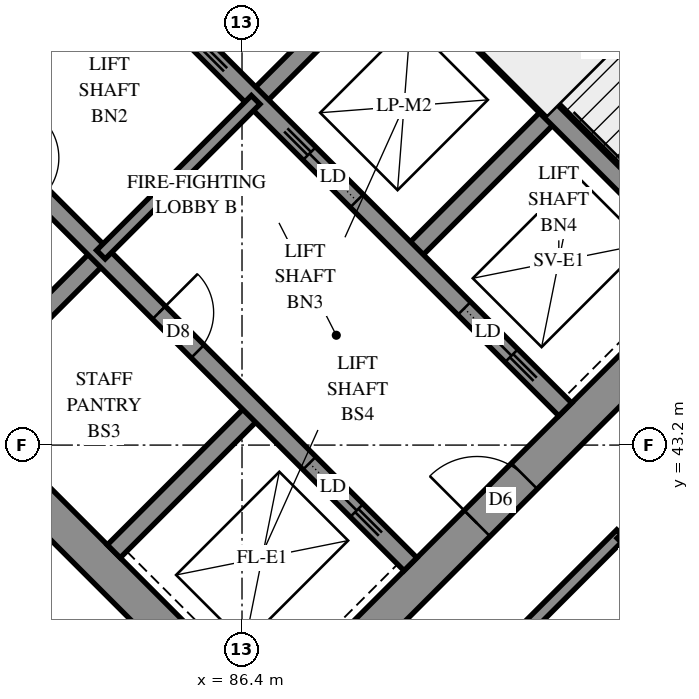
"""IFC4 building model, lengths in metres.
Left out: names, types, materials, properties, quantities, classifications, styles, units other than length and angle.
Written with IfcOpenShell. Run it as: python <this file> out.ifc"""

import sys

from ifc_helpers import new_model, si_unit, direction, frame, frame_2d, origin, place, context, subcontext, project, spatial, rectangle, extrude, element, fill, save


model = new_model("IFC4")
c1 = context("Model", 3, precision=1e-05, world=origin(), true_north=direction((0.0, 1.0)))
c2 = subcontext(c1, "Body", "Model", "MODEL_VIEW")
j1 = project(units=[si_unit("LENGTHUNIT", "METRE"), si_unit("PLANEANGLEUNIT", "RADIAN")], contexts=[c1])
p1 = place(None, origin())
s1 = spatial("IfcSite", under=j1, at=p1, CompositionType="ELEMENT")
p2 = place(p1, origin())
s2 = spatial("IfcBuilding", under=s1, at=p2, CompositionType="ELEMENT")
p3 = place(p2, frame((0.0, 0.0, 149.0)))
s3 = spatial("IfcBuildingStorey", under=s2, at=p3, CompositionType="ELEMENT", Elevation=149.0)
p4 = place(p3, frame((76.018, 49.302, -0.3), z_axis=(0.0, 0.0, 1.0), x_axis=(0.7071067812, -0.7071067812, 0.0)))
e1 = element("IfcWall", 1, at=p4, inside=s3, PredefinedType="SHEAR", context=c2, shape_type="SweptSolid", body=[
    extrude(rectangle(XDim=15.6, YDim=0.6, at=frame_2d((7.8, 0.0))), origin(), (0.0, 0.0, 1.0), 2.7),
])
p5 = place(p3, frame((86.625, 59.908, -0.3), z_axis=(0.0, 0.0, 1.0), x_axis=(0.7071067812, -0.7071067812, 0.0)))
e2 = element("IfcWall", 2, at=p5, inside=s3, PredefinedType="SHEAR", context=c2, shape_type="SweptSolid", body=[
    extrude(rectangle(XDim=15.6, YDim=0.6, at=frame_2d((7.8, 0.0))), origin(), (0.0, 0.0, 1.0), 2.7),
])
p6 = place(p5, frame((10.6, 0.0, 0.3)))
e3 = element("IfcOpeningElement", 3, at=p6, cuts=e2, PredefinedType="OPENING", context=c2, shape_type="SweptSolid", body=[
    extrude(rectangle(XDim=0.8, YDim=2.1, at=frame_2d((0.4, 1.05))), frame((0.0, 0.31, 0.0), z_axis=(0.0, -1.0, 0.0), x_axis=(1.0, 0.0, 0.0)), (0.0, 0.0, 1.0), 0.62),
])
p7 = place(p3, frame((76.442, 49.302, -0.3), z_axis=(0.0, 0.0, 1.0), x_axis=(0.7071067812, 0.7071067812, 0.0)))
e4 = element("IfcWall", 4, at=p7, inside=s3, PredefinedType="SHEAR", context=c2, shape_type="SweptSolid", body=[
    extrude(rectangle(XDim=14.4, YDim=0.6, at=frame_2d((7.2, 0.0))), origin(), (0.0, 0.0, 1.0), 2.7),
])
p8 = place(p7, frame((4.55, 0.0, 0.3)))
e5 = element("IfcOpeningElement", 5, at=p8, cuts=e4, PredefinedType="OPENING", context=c2, shape_type="SweptSolid", body=[
    extrude(rectangle(XDim=1.1, YDim=2.1, at=frame_2d((0.55, 1.05))), frame((0.0, 0.31, 0.0), z_axis=(0.0, -1.0, 0.0), x_axis=(1.0, 0.0, 0.0)), (0.0, 0.0, 1.0), 0.62),
])
p9 = place(p7, frame((11.35, 0.0, 0.3)))
e6 = element("IfcOpeningElement", 6, at=p9, cuts=e4, PredefinedType="OPENING", context=c2, shape_type="SweptSolid", body=[
    extrude(rectangle(XDim=1.1, YDim=2.1, at=frame_2d((0.55, 1.05))), frame((0.0, 0.31, 0.0), z_axis=(0.0, -1.0, 0.0), x_axis=(1.0, 0.0, 0.0)), (0.0, 0.0, 1.0), 0.62),
])
p10 = place(p3, frame((87.049, 38.695, -0.3), z_axis=(0.0, 0.0, 1.0), x_axis=(0.7071067812, 0.7071067812, 0.0)))
e7 = element("IfcWall", 7, at=p10, inside=s3, PredefinedType="SHEAR", context=c2, shape_type="SweptSolid", body=[
    extrude(rectangle(XDim=14.4, YDim=0.6, at=frame_2d((7.2, 0.0))), origin(), (0.0, 0.0, 1.0), 2.7),
])
p11 = place(p10, frame((4.55, 0.0, 0.3)))
e8 = element("IfcOpeningElement", 8, at=p11, cuts=e7, PredefinedType="OPENING", context=c2, shape_type="SweptSolid", body=[
    extrude(rectangle(XDim=1.1, YDim=2.1, at=frame_2d((0.55, 1.05))), frame((0.0, 0.31, 0.0), z_axis=(0.0, -1.0, 0.0), x_axis=(1.0, 0.0, 0.0)), (0.0, 0.0, 1.0), 0.62),
])
p12 = place(p10, frame((11.35, 0.0, 0.3)))
e9 = element("IfcOpeningElement", 9, at=p12, cuts=e7, PredefinedType="OPENING", context=c2, shape_type="SweptSolid", body=[
    extrude(rectangle(XDim=1.1, YDim=2.1, at=frame_2d((0.55, 1.05))), frame((0.0, 0.31, 0.0), z_axis=(0.0, -1.0, 0.0), x_axis=(1.0, 0.0, 0.0)), (0.0, 0.0, 1.0), 0.62),
])
p13 = place(p3, frame((81.746, 43.999, 0.0), z_axis=(0.0, 0.0, 1.0), x_axis=(0.7071067812, 0.7071067812, 0.0)))
e10 = element("IfcWall", 10, at=p13, inside=s3, PredefinedType="SOLIDWALL", context=c2, shape_type="SweptSolid", body=[
    extrude(rectangle(XDim=3.3, YDim=0.3, at=frame_2d((1.65, 0.0))), origin(), (0.0, 0.0, 1.0), 3.1),
])
p14 = place(p3, frame((86.625, 48.878, 0.0), z_axis=(0.0, 0.0, 1.0), x_axis=(0.7071067812, 0.7071067812, 0.0)))
e11 = element("IfcWall", 11, at=p14, inside=s3, PredefinedType="SOLIDWALL", context=c2, shape_type="SweptSolid", body=[
    extrude(rectangle(XDim=3.3, YDim=0.3, at=frame_2d((1.65, 0.0))), origin(), (0.0, 0.0, 1.0), 3.1),
])
p15 = place(p3, frame((84.291, 41.453, 0.0), z_axis=(0.0, 0.0, 1.0), x_axis=(0.7071067812, 0.7071067812, 0.0)))
e12 = element("IfcWall", 12, at=p15, inside=s3, PredefinedType="SOLIDWALL", context=c2, shape_type="SweptSolid", body=[
    extrude(rectangle(XDim=3.3, YDim=0.3, at=frame_2d((1.65, 0.0))), origin(), (0.0, 0.0, 1.0), 3.1),
])
p16 = place(p3, frame((89.17, 46.332, 0.0), z_axis=(0.0, 0.0, 1.0), x_axis=(0.7071067812, 0.7071067812, 0.0)))
e13 = element("IfcWall", 13, at=p16, inside=s3, PredefinedType="SOLIDWALL", context=c2, shape_type="SweptSolid", body=[
    extrude(rectangle(XDim=3.3, YDim=0.3, at=frame_2d((1.65, 0.0))), origin(), (0.0, 0.0, 1.0), 3.1),
])
p17 = place(p3, frame((78.988, 51.423, 0.0), z_axis=(0.0, 0.0, 1.0), x_axis=(0.7071067812, -0.7071067812, 0.0)))
e14 = element("IfcWall", 14, at=p17, inside=s3, PredefinedType="SOLIDWALL", context=c2, shape_type="SweptSolid", body=[
    extrude(rectangle(XDim=14.4, YDim=0.3, at=frame_2d((7.2, 0.0))), origin(), (0.0, 0.0, 1.0), 3.1),
])
p18 = place(p17, frame((1.35, 0.0, 0.0)))
e15 = element("IfcOpeningElement", 15, at=p18, cuts=e14, PredefinedType="OPENING", context=c2, shape_type="SweptSolid", body=[
    extrude(rectangle(XDim=0.9, YDim=2.1, at=frame_2d((0.45, 1.05))), frame((0.0, 0.16, 0.0), z_axis=(0.0, -1.0, 0.0), x_axis=(1.0, 0.0, 0.0)), (0.0, 0.0, 1.0), 0.32),
])
p19 = place(p17, frame((4.95, 0.0, 0.0)))
e16 = element("IfcOpeningElement", 16, at=p19, cuts=e14, PredefinedType="OPENING", context=c2, shape_type="SweptSolid", body=[
    extrude(rectangle(XDim=0.9, YDim=2.1, at=frame_2d((0.45, 1.05))), frame((0.0, 0.16, 0.0), z_axis=(0.0, -1.0, 0.0), x_axis=(1.0, 0.0, 0.0)), (0.0, 0.0, 1.0), 0.32),
])
p20 = place(p17, frame((8.55, 0.0, 0.0)))
e17 = element("IfcOpeningElement", 17, at=p20, cuts=e14, PredefinedType="OPENING", context=c2, shape_type="SweptSolid", body=[
    extrude(rectangle(XDim=0.9, YDim=2.1, at=frame_2d((0.45, 1.05))), frame((0.0, 0.16, 0.0), z_axis=(0.0, -1.0, 0.0), x_axis=(1.0, 0.0, 0.0)), (0.0, 0.0, 1.0), 0.32),
])
p21 = place(p17, frame((12.05, 0.0, 0.0)))
e18 = element("IfcOpeningElement", 18, at=p21, cuts=e14, PredefinedType="OPENING", context=c2, shape_type="SweptSolid", body=[
    extrude(rectangle(XDim=1.1, YDim=2.1, at=frame_2d((0.55, 1.05))), frame((0.0, 0.16, 0.0), z_axis=(0.0, -1.0, 0.0), x_axis=(1.0, 0.0, 0.0)), (0.0, 0.0, 1.0), 0.32),
])
p22 = place(p3, frame((81.534, 53.969, 0.0), z_axis=(0.0, 0.0, 1.0), x_axis=(0.707103309, -0.7071102534, 0.0)))
e19 = element("IfcWall", 19, at=p22, inside=s3, PredefinedType="SOLIDWALL", context=c2, shape_type="SweptSolid", body=[
    extrude(rectangle(XDim=14.4, YDim=0.3, at=frame_2d((7.2, 0.0))), origin(), (0.0, 0.0, 1.0), 3.1),
])
p23 = place(p22, frame((1.25, 0.0, 0.0)))
e20 = element("IfcOpeningElement", 20, at=p23, cuts=e19, PredefinedType="OPENING", context=c2, shape_type="SweptSolid", body=[
    extrude(rectangle(XDim=1.1, YDim=2.1, at=frame_2d((0.55, 1.05))), frame((0.0, 0.16, 0.0), z_axis=(0.0, -1.0, 0.0), x_axis=(1.0, 0.0, 0.0)), (0.0, 0.0, 1.0), 0.32),
])
p24 = place(p22, frame((4.85, 0.0, 0.0)))
e21 = element("IfcOpeningElement", 21, at=p24, cuts=e19, PredefinedType="OPENING", context=c2, shape_type="SweptSolid", body=[
    extrude(rectangle(XDim=1.1, YDim=2.1, at=frame_2d((0.55, 1.05))), frame((0.0, 0.16, 0.0), z_axis=(0.0, -1.0, 0.0), x_axis=(1.0, 0.0, 0.0)), (0.0, 0.0, 1.0), 0.32),
])
p25 = place(p22, frame((8.45, 0.0, 0.0)))
e22 = element("IfcOpeningElement", 22, at=p25, cuts=e19, PredefinedType="OPENING", context=c2, shape_type="SweptSolid", body=[
    extrude(rectangle(XDim=1.1, YDim=2.1, at=frame_2d((0.55, 1.05))), frame((0.0, 0.16, 0.0), z_axis=(0.0, -1.0, 0.0), x_axis=(1.0, 0.0, 0.0)), (0.0, 0.0, 1.0), 0.32),
])
p26 = place(p22, frame((12.05, 0.0, 0.0)))
e23 = element("IfcOpeningElement", 23, at=p26, cuts=e19, PredefinedType="OPENING", context=c2, shape_type="SweptSolid", body=[
    extrude(rectangle(XDim=1.1, YDim=2.1, at=frame_2d((0.55, 1.05))), frame((0.0, 0.16, 0.0), z_axis=(0.0, -1.0, 0.0), x_axis=(1.0, 0.0, 0.0)), (0.0, 0.0, 1.0), 0.32),
])
p27 = place(p3, frame((88.958, 51.211, 0.0), z_axis=(0.0, 0.0, 1.0), x_axis=(0.7070998367, -0.7071137256, 0.0)))
e24 = element("IfcWall", 24, at=p27, inside=s3, PredefinedType="SOLIDWALL", context=c2, shape_type="SweptSolid", body=[
    extrude(rectangle(XDim=7.2, YDim=0.3, at=frame_2d((3.6, 0.0))), origin(), (0.0, 0.0, 1.0), 3.1),
])
p28 = place(p3, frame((91.313, 53.354, 0.0), z_axis=(0.0, 0.0, 1.0), x_axis=(0.7071067812, -0.7071067812, 0.0)))
e25 = element("IfcWall", 25, at=p28, inside=s3, PredefinedType="PARTITIONING", context=c2, shape_type="SweptSolid", body=[
    extrude(rectangle(XDim=5.95, YDim=0.15, at=frame_2d((2.975, 0.0))), origin(), (0.0, 0.0, 1.0), 3.1),
])
p29 = place(p3, frame((84.079, 46.332, 0.0), z_axis=(0.0, 0.0, 1.0), x_axis=(0.7071067812, 0.7071067812, 0.0)))
e26 = element("IfcWall", 26, at=p29, inside=s3, PredefinedType="PARTITIONING", context=c2, shape_type="SweptSolid", body=[
    extrude(rectangle(XDim=3.6, YDim=0.2, at=frame_2d((1.8, 0.0))), origin(), (0.0, 0.0, 1.0), 3.1),
])
p30 = place(p3, frame((91.755, 57.317, 0.0), z_axis=(0.0, 0.0, 1.0), x_axis=(0.7071067812, -0.7071067812, 0.0)))
e27 = element("IfcWall", 27, at=p30, inside=s3, PredefinedType="PARTITIONING", context=c2, shape_type="SweptSolid", body=[
    extrude(rectangle(XDim=11.639, YDim=0.2, at=frame_2d((5.819, 0.0))), origin(), (0.0, 0.0, 1.0), 3.1),
])
p31 = place(p3, frame((80.899, 41.869, 0.0), z_axis=(0.0, 0.0, 1.0), x_axis=(0.7071067812, -0.7071067812, 0.0)))
e28 = element("IfcWall", 28, at=p31, inside=s3, PredefinedType="PARTITIONING", context=c2, shape_type="SweptSolid", body=[
    extrude(rectangle(XDim=8.392, YDim=0.2, at=frame_2d((4.196, 0.0))), origin(), (0.0, 0.0, 1.0), 3.1),
])
p32 = place(p31, frame((4.988, 0.0, 0.0)))
e29 = element("IfcOpeningElement", 29, at=p32, cuts=e28, PredefinedType="OPENING", context=c2, shape_type="SweptSolid", body=[
    extrude(rectangle(XDim=0.9, YDim=2.1, at=frame_2d((0.45, 1.05))), frame((0.0, 0.11, 0.0), z_axis=(0.0, -1.0, 0.0), x_axis=(1.0, 0.0, 0.0)), (0.0, 0.0, 1.0), 0.22),
])
p33 = place(p3, frame((86.836, 35.938, 0.0), z_axis=(0.0, 0.0, 1.0), x_axis=(0.7071067812, 0.7071067812, 0.0)))
e30 = element("IfcWall", 30, at=p33, inside=s3, PredefinedType="PARTITIONING", context=c2, shape_type="SweptSolid", body=[
    extrude(rectangle(XDim=8.2, YDim=0.2, at=frame_2d((4.1, 0.0))), origin(), (0.0, 0.0, 1.0), 3.1),
])
p34 = place(p3, frame((92.639, 41.739, 0.0), z_axis=(0.0, 0.0, 1.0), x_axis=(0.7071067812, -0.7071067812, 0.0)))
e31 = element("IfcWall", 31, at=p34, inside=s3, PredefinedType="PARTITIONING", context=c2, shape_type="SweptSolid", body=[
    extrude(rectangle(XDim=5.1, YDim=0.2, at=frame_2d((2.55, 0.0))), origin(), (0.0, 0.0, 1.0), 3.1),
])
p35 = place(p34, frame((0.123, 0.0, 0.0)))
e32 = element("IfcOpeningElement", 32, at=p35, cuts=e31, PredefinedType="OPENING", context=c2, shape_type="SweptSolid", body=[
    extrude(rectangle(XDim=1.0, YDim=2.1, at=frame_2d((0.5, 1.05))), frame((0.0, 0.11, 0.0), z_axis=(0.0, -1.0, 0.0), x_axis=(1.0, 0.0, 0.0)), (0.0, 0.0, 1.0), 0.22),
])
p36 = place(p34, frame((3.734, 0.0, 0.0)))
e33 = element("IfcOpeningElement", 33, at=p36, cuts=e31, PredefinedType="OPENING", context=c2, shape_type="SweptSolid", body=[
    extrude(rectangle(XDim=0.9, YDim=2.1, at=frame_2d((0.45, 1.05))), frame((0.0, 0.11, 0.0), z_axis=(0.0, -1.0, 0.0), x_axis=(1.0, 0.0, 0.0)), (0.0, 0.0, 1.0), 0.22),
])
p37 = place(p3, frame((91.997, 38.979, 0.0), z_axis=(0.0, 0.0, 1.0), x_axis=(0.7071067812, 0.7071067812, 0.0)))
e34 = element("IfcWall", 34, at=p37, inside=s3, PredefinedType="PARTITIONING", context=c2, shape_type="SweptSolid", body=[
    extrude(rectangle(XDim=2.401, YDim=0.15, at=frame_2d((1.201, 0.0))), origin(), (0.0, 0.0, 1.0), 3.1),
])
p38 = place(p11, origin())
e35 = element("IfcDoor", 35, at=p38, inside=s3, OperationType="DOUBLE_DOOR_SINGLE_SWING", PredefinedType="DOOR", context=c2, shape_type="SweptSolid", body=[
    extrude(rectangle(XDim=1.1, YDim=2.1, at=frame_2d((0.55, 1.05))), frame((0.0, 0.025, 0.0), z_axis=(0.0, -1.0, 0.0), x_axis=(1.0, 0.0, 0.0)), (0.0, 0.0, 1.0), 0.05),
])
fill(e8, e35)
p39 = place(p20, origin())
e36 = element("IfcDoor", 36, at=p39, inside=s3, OperationType="SINGLE_SWING_LEFT", PredefinedType="DOOR", context=c2, shape_type="SweptSolid", body=[
    extrude(rectangle(XDim=0.9, YDim=2.1, at=frame_2d((0.45, 1.05))), frame((0.0, 0.025, 0.0), z_axis=(0.0, -1.0, 0.0), x_axis=(1.0, 0.0, 0.0)), (0.0, 0.0, 1.0), 0.05),
])
fill(e17, e36)
p40 = place(p21, origin())
e37 = element("IfcDoor", 37, at=p40, inside=s3, OperationType="SLIDING_TO_RIGHT", PredefinedType="DOOR", context=c2, shape_type="SweptSolid", body=[
    extrude(rectangle(XDim=1.1, YDim=2.1, at=frame_2d((0.55, 1.05))), frame((0.0, 0.025, 0.0), z_axis=(0.0, -1.0, 0.0), x_axis=(1.0, 0.0, 0.0)), (0.0, 0.0, 1.0), 0.05),
])
fill(e18, e37)
p41 = place(p25, origin())
e38 = element("IfcDoor", 38, at=p41, inside=s3, OperationType="SLIDING_TO_LEFT", PredefinedType="DOOR", context=c2, shape_type="SweptSolid", body=[
    extrude(rectangle(XDim=1.1, YDim=2.1, at=frame_2d((0.55, 1.05))), frame((0.0, 0.025, 0.0), z_axis=(0.0, -1.0, 0.0), x_axis=(1.0, 0.0, 0.0)), (0.0, 0.0, 1.0), 0.05),
])
fill(e22, e38)
p42 = place(p26, origin())
e39 = element("IfcDoor", 39, at=p42, inside=s3, OperationType="SLIDING_TO_RIGHT", PredefinedType="DOOR", context=c2, shape_type="SweptSolid", body=[
    extrude(rectangle(XDim=1.1, YDim=2.1, at=frame_2d((0.55, 1.05))), frame((0.0, 0.025, 0.0), z_axis=(0.0, -1.0, 0.0), x_axis=(1.0, 0.0, 0.0)), (0.0, 0.0, 1.0), 0.05),
])
fill(e23, e39)
save(model, sys.argv[1])
